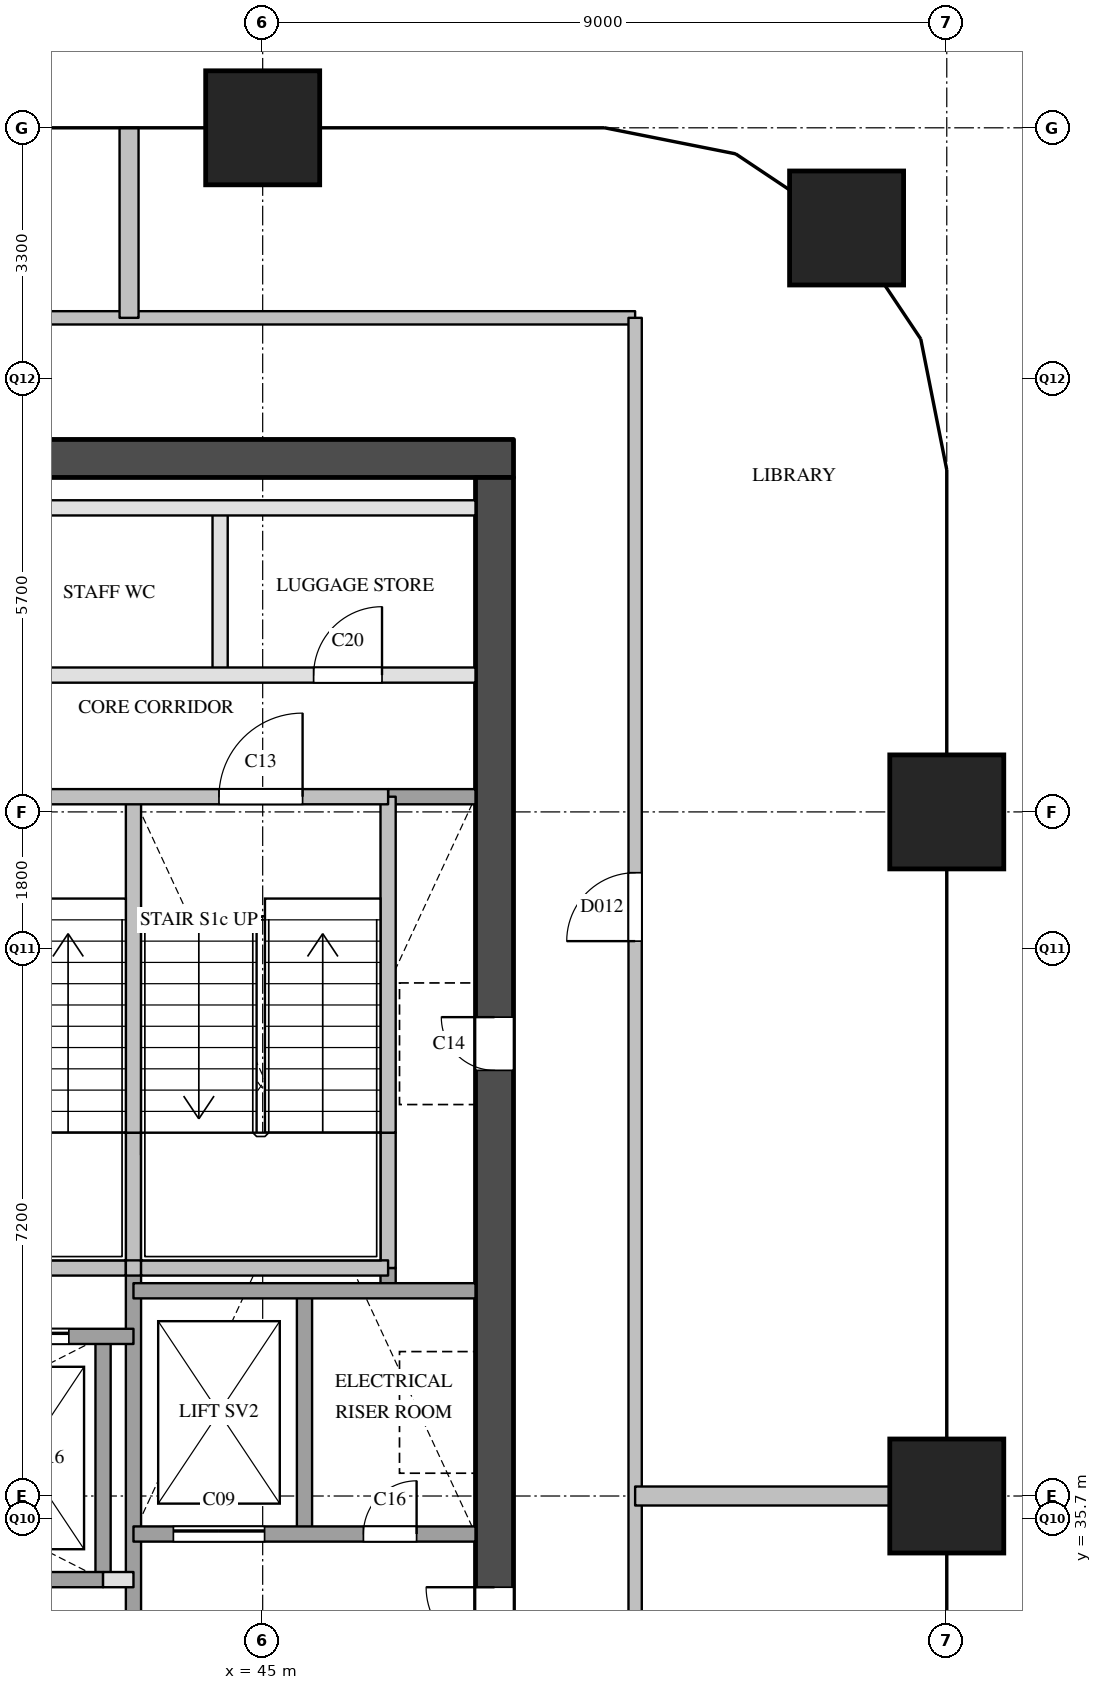
"""IFC4 building model, lengths in metres.
Left out: names, types, materials, properties, quantities, classifications, styles, units other than length and angle.
Written with IfcOpenShell. Run it as: python <this file> out.ifc"""

import sys

from ifc_helpers import new_model, si_unit, direction, frame, frame_2d, origin, origin_2d, place, context, subcontext, project, spatial, rectangle, extrude, element, fill, save


model = new_model("IFC4")
c1 = context("Model", 3, precision=1e-05, world=origin(), true_north=direction((0.0, 1.0)))
c2 = subcontext(c1, "Body", "Model", "MODEL_VIEW")
j1 = project(units=[si_unit("LENGTHUNIT", "METRE"), si_unit("PLANEANGLEUNIT", "RADIAN")], contexts=[c1])
p1 = place(None, origin())
s1 = spatial("IfcSite", under=j1, at=p1, CompositionType="ELEMENT")
p2 = place(p1, origin())
s2 = spatial("IfcBuilding", under=s1, at=p2, CompositionType="ELEMENT")
p3 = place(p2, frame((0.0, 0.0, 154.4)))
s3 = spatial("IfcBuildingStorey", under=s2, at=p3, CompositionType="ELEMENT", Elevation=154.4)
for number, where, z_axis, x_axis in (
    (1, (45.0, 54.0, 0.0), (0.0, 0.0, 1.0), (1.0, 0.0, 0.0)),
    (2, (54.0, 36.0, 0.0), (0.0, 0.0, 1.0), (1.0, 0.0, 0.0)),
    (3, (54.0, 45.0, 0.0), (0.0, 0.0, 1.0), (1.0, 0.0, 0.0)),
    (4, (52.682, 52.682, 0.0), (0.0, 0.0, 1.0), (1.0, 0.0, 0.0)),
):
    element("IfcColumn", number, at=place(p3, frame(where, z_axis=z_axis, x_axis=x_axis)), inside=s3, PredefinedType="COLUMN", context=c2, shape_type="SweptSolid", body=[
        extrude(rectangle(XDim=1.5, YDim=1.5, at=origin_2d()), origin(), (0.0, 0.0, 1.0), 3.9),
    ])
p4 = place(p3, frame((36.1, 49.65, 0.0), z_axis=(0.0, 0.0, 1.0), x_axis=(1.0, 0.0, 0.0)))
e5 = element("IfcWall", 5, at=p4, inside=s3, PredefinedType="SHEAR", context=c2, shape_type="SweptSolid", body=[
    extrude(rectangle(XDim=12.2, YDim=0.5, at=frame_2d((6.1, 0.0))), origin(), (0.0, 0.0, 1.0), 3.6),
])
p5 = place(p3, frame((48.05, 29.1, 0.0), z_axis=(0.0, 0.0, 1.0), x_axis=(0.0, 1.0, 0.0)))
e6 = element("IfcWall", 6, at=p5, inside=s3, PredefinedType="SHEAR", context=c2, shape_type="SweptSolid", body=[
    extrude(rectangle(XDim=20.3, YDim=0.5, at=frame_2d((10.15, 0.0))), origin(), (0.0, 0.0, 1.0), 3.6),
])
p6 = place(p5, frame((12.5, 0.0, 0.0)))
e7 = element("IfcOpeningElement", 7, at=p6, cuts=e6, PredefinedType="OPENING", context=c2, shape_type="SweptSolid", body=[
    extrude(rectangle(XDim=0.7, YDim=2.1, at=frame_2d((0.35, 1.05))), frame((0.0, 0.26, 0.0), z_axis=(0.0, -1.0, 0.0), x_axis=(1.0, 0.0, 0.0)), (0.0, 0.0, 1.0), 0.52),
])
p7 = place(p5, frame((3.9, 0.0, 0.0)))
e8 = element("IfcOpeningElement", 8, at=p7, cuts=e6, PredefinedType="OPENING", context=c2, shape_type="SweptSolid", body=[
    extrude(rectangle(XDim=1.8, YDim=2.1, at=frame_2d((0.9, 1.05))), frame((0.0, 0.26, 0.0), z_axis=(0.0, -1.0, 0.0), x_axis=(1.0, 0.0, 0.0)), (0.0, 0.0, 1.0), 0.52),
])
p8 = place(p3, frame((42.9, 34.9, 0.0), z_axis=(0.0, 0.0, 1.0), x_axis=(0.0, 1.0, 0.0)))
e9 = element("IfcWall", 9, at=p8, inside=s3, PredefinedType="SOLIDWALL", context=c2, shape_type="SweptSolid", body=[
    extrude(rectangle(XDim=3.2, YDim=0.2, at=frame_2d((1.6, 0.0))), origin(), (0.0, 0.0, 1.0), 3.6),
])
p9 = place(p3, frame((43.3, 29.1, 0.0), z_axis=(0.0, 0.0, 1.0), x_axis=(0.0, 1.0, 0.0)))
e10 = element("IfcWall", 10, at=p9, inside=s3, PredefinedType="SOLIDWALL", context=c2, shape_type="SweptSolid", body=[
    extrude(rectangle(XDim=9.9, YDim=0.2, at=frame_2d((4.95, 0.0))), origin(), (0.0, 0.0, 1.0), 3.6),
])
p10 = place(p3, frame((43.3, 39.0, 0.0), z_axis=(0.0, 0.0, 1.0), x_axis=(0.0, 1.0, 0.0)))
e11 = element("IfcWall", 11, at=p10, inside=s3, PredefinedType="SOLIDWALL", context=c2, shape_type="SweptSolid", body=[
    extrude(rectangle(XDim=1.78, YDim=0.2, at=frame_2d((0.89, 0.0))), origin(), (0.0, 0.0, 1.0), 3.6),
])
p11 = place(p3, frame((43.3, 40.78, 0.0), z_axis=(0.0, 0.0, 1.0), x_axis=(0.0, 1.0, 0.0)))
e12 = element("IfcWall", 12, at=p11, inside=s3, PredefinedType="SOLIDWALL", context=c2, shape_type="SweptSolid", body=[
    extrude(rectangle(XDim=4.42, YDim=0.2, at=frame_2d((2.21, 0.0))), origin(), (0.0, 0.0, 1.0), 3.6),
])
p12 = place(p3, frame((44.44, 46.8, 0.0), z_axis=(0.0, 0.0, 1.0), x_axis=(0.0, 1.0, 0.0)))
e13 = element("IfcWall", 13, at=p12, inside=s3, PredefinedType="PARTITIONING", context=c2, shape_type="SweptSolid", body=[
    extrude(rectangle(XDim=2.2, YDim=0.2, at=frame_2d((1.1, 0.0))), origin(), (0.0, 0.0, 1.0), 3.6),
])
p13 = place(p3, frame((45.55, 35.5, 0.0), z_axis=(0.0, 0.0, 1.0), x_axis=(0.0, 1.0, 0.0)))
e14 = element("IfcWall", 14, at=p13, inside=s3, PredefinedType="SOLIDWALL", context=c2, shape_type="SweptSolid", body=[
    extrude(rectangle(XDim=3.2, YDim=0.2, at=frame_2d((1.6, 0.0))), origin(), (0.0, 0.0, 1.0), 3.6),
])
p14 = place(p3, frame((46.65, 38.7, 0.0), z_axis=(0.0, 0.0, 1.0), x_axis=(0.0, 1.0, 0.0)))
e15 = element("IfcWall", 15, at=p14, inside=s3, PredefinedType="SOLIDWALL", context=c2, shape_type="SweptSolid", body=[
    extrude(rectangle(XDim=0.3, YDim=0.2, at=frame_2d((0.15, 0.0))), origin(), (0.0, 0.0, 1.0), 3.6),
])
p15 = place(p3, frame((46.65, 39.0, 0.0), z_axis=(0.0, 0.0, 1.0), x_axis=(0.0, 1.0, 0.0)))
e16 = element("IfcWall", 16, at=p15, inside=s3, PredefinedType="SOLIDWALL", context=c2, shape_type="SweptSolid", body=[
    extrude(rectangle(XDim=1.78, YDim=0.2, at=frame_2d((0.89, 0.0))), origin(), (0.0, 0.0, 1.0), 3.6),
])
p16 = place(p3, frame((46.65, 40.78, 0.0), z_axis=(0.0, 0.0, 1.0), x_axis=(0.0, 1.0, 0.0)))
e17 = element("IfcWall", 17, at=p16, inside=s3, PredefinedType="SOLIDWALL", context=c2, shape_type="SweptSolid", body=[
    extrude(rectangle(XDim=4.42, YDim=0.2, at=frame_2d((2.21, 0.0))), origin(), (0.0, 0.0, 1.0), 3.6),
])
p17 = place(p3, frame((42.9, 34.9, 0.0), z_axis=(0.0, 0.0, 1.0), x_axis=(1.0, 0.0, 0.0)))
e18 = element("IfcWall", 18, at=p17, inside=s3, PredefinedType="PARTITIONING", context=c2, shape_type="SweptSolid", body=[
    extrude(rectangle(XDim=0.4, YDim=0.2, at=frame_2d((0.2, 0.0))), origin(), (0.0, 0.0, 1.0), 3.6),
])
p18 = place(p3, frame((36.6, 34.9, 0.0), z_axis=(0.0, 0.0, 1.0), x_axis=(1.0, 0.0, 0.0)))
e19 = element("IfcWall", 19, at=p18, inside=s3, PredefinedType="SOLIDWALL", context=c2, shape_type="SweptSolid", body=[
    extrude(rectangle(XDim=6.3, YDim=0.2, at=frame_2d((3.15, 0.0))), origin(), (0.0, 0.0, 1.0), 3.6),
])
p19 = place(p3, frame((43.3, 35.5, 0.0), z_axis=(0.0, 0.0, 1.0), x_axis=(1.0, 0.0, 0.0)))
e20 = element("IfcWall", 20, at=p19, inside=s3, PredefinedType="SOLIDWALL", context=c2, shape_type="SweptSolid", body=[
    extrude(rectangle(XDim=4.5, YDim=0.2, at=frame_2d((2.25, 0.0))), origin(), (0.0, 0.0, 1.0), 3.6),
])
p20 = place(p19, frame((0.525, 0.0, 0.0)))
e21 = element("IfcOpeningElement", 21, at=p20, cuts=e20, PredefinedType="OPENING", context=c2, shape_type="SweptSolid", body=[
    extrude(rectangle(XDim=1.2, YDim=2.1, at=frame_2d((0.6, 1.05))), frame((0.0, 0.11, 0.0), z_axis=(0.0, -1.0, 0.0), x_axis=(1.0, 0.0, 0.0)), (0.0, 0.0, 1.0), 0.22),
])
p21 = place(p19, frame((3.025, 0.0, 0.0)))
e22 = element("IfcOpeningElement", 22, at=p21, cuts=e20, PredefinedType="OPENING", context=c2, shape_type="SweptSolid", body=[
    extrude(rectangle(XDim=0.7, YDim=2.1, at=frame_2d((0.35, 1.05))), frame((0.0, 0.11, 0.0), z_axis=(0.0, -1.0, 0.0), x_axis=(1.0, 0.0, 0.0)), (0.0, 0.0, 1.0), 0.22),
])
p22 = place(p3, frame((36.6, 38.1, 0.0), z_axis=(0.0, 0.0, 1.0), x_axis=(1.0, 0.0, 0.0)))
e23 = element("IfcWall", 23, at=p22, inside=s3, PredefinedType="SOLIDWALL", context=c2, shape_type="SweptSolid", body=[
    extrude(rectangle(XDim=6.7, YDim=0.2, at=frame_2d((3.35, 0.0))), origin(), (0.0, 0.0, 1.0), 3.6),
])
p23 = place(p22, frame((0.45, 0.0, 0.0)))
e24 = element("IfcOpeningElement", 24, at=p23, cuts=e23, PredefinedType="OPENING", context=c2, shape_type="SweptSolid", body=[
    extrude(rectangle(XDim=1.2, YDim=2.1, at=frame_2d((0.6, 1.05))), frame((0.0, 0.11, 0.0), z_axis=(0.0, -1.0, 0.0), x_axis=(1.0, 0.0, 0.0)), (0.0, 0.0, 1.0), 0.22),
])
p24 = place(p22, frame((2.55, 0.0, 0.0)))
e25 = element("IfcOpeningElement", 25, at=p24, cuts=e23, PredefinedType="OPENING", context=c2, shape_type="SweptSolid", body=[
    extrude(rectangle(XDim=1.2, YDim=2.1, at=frame_2d((0.6, 1.05))), frame((0.0, 0.11, 0.0), z_axis=(0.0, -1.0, 0.0), x_axis=(1.0, 0.0, 0.0)), (0.0, 0.0, 1.0), 0.22),
])
p25 = place(p22, frame((4.65, 0.0, 0.0)))
e26 = element("IfcOpeningElement", 26, at=p25, cuts=e23, PredefinedType="OPENING", context=c2, shape_type="SweptSolid", body=[
    extrude(rectangle(XDim=1.2, YDim=2.1, at=frame_2d((0.6, 1.05))), frame((0.0, 0.11, 0.0), z_axis=(0.0, -1.0, 0.0), x_axis=(1.0, 0.0, 0.0)), (0.0, 0.0, 1.0), 0.22),
])
p26 = place(p3, frame((43.3, 38.7, 0.0), z_axis=(0.0, 0.0, 1.0), x_axis=(1.0, 0.0, 0.0)))
e27 = element("IfcWall", 27, at=p26, inside=s3, PredefinedType="SOLIDWALL", context=c2, shape_type="SweptSolid", body=[
    extrude(rectangle(XDim=4.5, YDim=0.2, at=frame_2d((2.25, 0.0))), origin(), (0.0, 0.0, 1.0), 3.6),
])
p27 = place(p3, frame((40.05, 39.0, 0.0), z_axis=(0.0, 0.0, 1.0), x_axis=(1.0, 0.0, 0.0)))
e28 = element("IfcWall", 28, at=p27, inside=s3, PredefinedType="SOLIDWALL", context=c2, shape_type="SweptSolid", body=[
    extrude(rectangle(XDim=3.15, YDim=0.2, at=frame_2d((1.575, 0.0))), origin(), (0.0, 0.0, 1.0), 3.6),
])
p28 = place(p3, frame((43.2, 39.0, 0.0), z_axis=(0.0, 0.0, 1.0), x_axis=(1.0, 0.0, 0.0)))
e29 = element("IfcWall", 29, at=p28, inside=s3, PredefinedType="SOLIDWALL", context=c2, shape_type="SweptSolid", body=[
    extrude(rectangle(XDim=0.2, YDim=0.2, at=frame_2d((0.1, 0.0))), origin(), (0.0, 0.0, 1.0), 3.6),
])
p29 = place(p3, frame((43.4, 39.0, 0.0), z_axis=(0.0, 0.0, 1.0), x_axis=(1.0, 0.0, 0.0)))
e30 = element("IfcWall", 30, at=p29, inside=s3, PredefinedType="SOLIDWALL", context=c2, shape_type="SweptSolid", body=[
    extrude(rectangle(XDim=3.25, YDim=0.2, at=frame_2d((1.625, 0.0))), origin(), (0.0, 0.0, 1.0), 3.6),
])
p30 = place(p3, frame((46.65, 45.2, 0.0), z_axis=(0.0, 0.0, 1.0), x_axis=(1.0, 0.0, 0.0)))
e31 = element("IfcWall", 31, at=p30, inside=s3, PredefinedType="SOLIDWALL", context=c2, shape_type="SweptSolid", body=[
    extrude(rectangle(XDim=1.15, YDim=0.2, at=frame_2d((0.575, 0.0))), origin(), (0.0, 0.0, 1.0), 3.6),
])
p31 = place(p3, frame((36.6, 45.2, 0.0), z_axis=(0.0, 0.0, 1.0), x_axis=(1.0, 0.0, 0.0)))
e32 = element("IfcWall", 32, at=p31, inside=s3, PredefinedType="SOLIDWALL", context=c2, shape_type="SweptSolid", body=[
    extrude(rectangle(XDim=10.05, YDim=0.2, at=frame_2d((5.025, 0.0))), origin(), (0.0, 0.0, 1.0), 3.6),
])
p32 = place(p31, frame((1.125, 0.0, 0.0)))
e33 = element("IfcOpeningElement", 33, at=p32, cuts=e32, PredefinedType="OPENING", context=c2, shape_type="SweptSolid", body=[
    extrude(rectangle(XDim=1.1, YDim=2.1, at=frame_2d((0.55, 1.05))), frame((0.0, 0.11, 0.0), z_axis=(0.0, -1.0, 0.0), x_axis=(1.0, 0.0, 0.0)), (0.0, 0.0, 1.0), 0.22),
])
p33 = place(p31, frame((4.475, 0.0, 0.0)))
e34 = element("IfcOpeningElement", 34, at=p33, cuts=e32, PredefinedType="OPENING", context=c2, shape_type="SweptSolid", body=[
    extrude(rectangle(XDim=1.1, YDim=2.1, at=frame_2d((0.55, 1.05))), frame((0.0, 0.11, 0.0), z_axis=(0.0, -1.0, 0.0), x_axis=(1.0, 0.0, 0.0)), (0.0, 0.0, 1.0), 0.22),
])
p34 = place(p31, frame((7.825, 0.0, 0.0)))
e35 = element("IfcOpeningElement", 35, at=p34, cuts=e32, PredefinedType="OPENING", context=c2, shape_type="SweptSolid", body=[
    extrude(rectangle(XDim=1.1, YDim=2.1, at=frame_2d((0.55, 1.05))), frame((0.0, 0.11, 0.0), z_axis=(0.0, -1.0, 0.0), x_axis=(1.0, 0.0, 0.0)), (0.0, 0.0, 1.0), 0.22),
])
p35 = place(p3, frame((36.6, 46.8, 0.0), z_axis=(0.0, 0.0, 1.0), x_axis=(1.0, 0.0, 0.0)))
e36 = element("IfcWall", 36, at=p35, inside=s3, PredefinedType="PARTITIONING", context=c2, shape_type="SweptSolid", body=[
    extrude(rectangle(XDim=11.2, YDim=0.2, at=frame_2d((5.6, 0.0))), origin(), (0.0, 0.0, 1.0), 3.6),
])
p36 = place(p35, frame((0.67, 0.0, 0.0)))
e37 = element("IfcOpeningElement", 37, at=p36, cuts=e36, PredefinedType="OPENING", context=c2, shape_type="SweptSolid", body=[
    extrude(rectangle(XDim=0.9, YDim=2.1, at=frame_2d((0.45, 1.05))), frame((0.0, 0.11, 0.0), z_axis=(0.0, -1.0, 0.0), x_axis=(1.0, 0.0, 0.0)), (0.0, 0.0, 1.0), 0.22),
])
p37 = place(p35, frame((4.59, 0.0, 0.0)))
e38 = element("IfcOpeningElement", 38, at=p37, cuts=e36, PredefinedType="OPENING", context=c2, shape_type="SweptSolid", body=[
    extrude(rectangle(XDim=0.9, YDim=2.1, at=frame_2d((0.45, 1.05))), frame((0.0, 0.11, 0.0), z_axis=(0.0, -1.0, 0.0), x_axis=(1.0, 0.0, 0.0)), (0.0, 0.0, 1.0), 0.22),
])
p38 = place(p35, frame((9.07, 0.0, 0.0)))
e39 = element("IfcOpeningElement", 39, at=p38, cuts=e36, PredefinedType="OPENING", context=c2, shape_type="SweptSolid", body=[
    extrude(rectangle(XDim=0.9, YDim=2.1, at=frame_2d((0.45, 1.05))), frame((0.0, 0.11, 0.0), z_axis=(0.0, -1.0, 0.0), x_axis=(1.0, 0.0, 0.0)), (0.0, 0.0, 1.0), 0.22),
])
p39 = place(p3, frame((36.6, 49.0, 0.0), z_axis=(0.0, 0.0, 1.0), x_axis=(1.0, 0.0, 0.0)))
e40 = element("IfcWall", 40, at=p39, inside=s3, PredefinedType="PARTITIONING", context=c2, shape_type="SweptSolid", body=[
    extrude(rectangle(XDim=11.2, YDim=0.2, at=frame_2d((5.6, 0.0))), origin(), (0.0, 0.0, 1.0), 3.6),
])
p40 = place(p3, frame((34.5, 51.5, 0.0), z_axis=(0.0, 0.0, 1.0), x_axis=(1.0, 0.0, 0.0)))
e41 = element("IfcWall", 41, at=p40, inside=s3, PredefinedType="PARTITIONING", context=c2, shape_type="SweptSolid", body=[
    extrude(rectangle(XDim=15.4, YDim=0.175, at=frame_2d((7.7, 0.0))), origin(), (0.0, 0.0, 1.0), 3.6),
])
p41 = place(p3, frame((49.9, 28.5, 0.0), z_axis=(0.0, 0.0, 1.0), x_axis=(0.0, 1.0, 0.0)))
e42 = element("IfcWall", 42, at=p41, inside=s3, PredefinedType="PARTITIONING", context=c2, shape_type="SweptSolid", body=[
    extrude(rectangle(XDim=23.0, YDim=0.175, at=frame_2d((11.5, 0.0))), origin(), (0.0, 0.0, 1.0), 3.6),
])
p42 = place(p41, frame((3.3, 0.0, 0.0)))
e43 = element("IfcOpeningElement", 43, at=p42, cuts=e42, PredefinedType="OPENING", context=c2, shape_type="SweptSolid", body=[
    extrude(rectangle(XDim=0.9, YDim=2.1, at=frame_2d((0.45, 1.05))), frame((0.0, 0.097, 0.0), z_axis=(0.0, -1.0, 0.0), x_axis=(1.0, 0.0, 0.0)), (0.0, 0.0, 1.0), 0.195),
])
p43 = place(p41, frame((14.8, 0.0, 0.0)))
e44 = element("IfcOpeningElement", 44, at=p43, cuts=e42, PredefinedType="OPENING", context=c2, shape_type="SweptSolid", body=[
    extrude(rectangle(XDim=0.9, YDim=2.1, at=frame_2d((0.45, 1.05))), frame((0.0, 0.097, 0.0), z_axis=(0.0, -1.0, 0.0), x_axis=(1.0, 0.0, 0.0)), (0.0, 0.0, 1.0), 0.195),
])
p44 = place(p3, frame((49.9, 36.0, 0.0), z_axis=(0.0, 0.0, 1.0), x_axis=(1.0, 0.0, 0.0)))
e45 = element("IfcWall", 45, at=p44, inside=s3, PredefinedType="PARTITIONING", context=c2, shape_type="SweptSolid", body=[
    extrude(rectangle(XDim=4.1, YDim=0.25, at=frame_2d((2.05, 0.0))), origin(), (0.0, 0.0, 1.0), 3.6),
])
p45 = place(p3, frame((43.242, 51.5, 0.0), z_axis=(0.0, 0.0, 1.0), x_axis=(0.0, 1.0, 0.0)))
e46 = element("IfcWall", 46, at=p45, inside=s3, PredefinedType="PARTITIONING", context=c2, shape_type="SweptSolid", body=[
    extrude(rectangle(XDim=2.5, YDim=0.25, at=frame_2d((1.25, 0.0))), origin(), (0.0, 0.0, 1.0), 2.6),
])
p46 = place(p25, origin())
e47 = element("IfcDoor", 47, at=p46, inside=s3, OperationType="SLIDING_TO_LEFT", PredefinedType="DOOR", context=c2, shape_type="SweptSolid", body=[
    extrude(rectangle(XDim=1.2, YDim=2.1, at=frame_2d((0.6, 1.05))), frame((0.0, 0.025, 0.0), z_axis=(0.0, -1.0, 0.0), x_axis=(1.0, 0.0, 0.0)), (0.0, 0.0, 1.0), 0.05),
])
fill(e26, e47)
p47 = place(p20, origin())
e48 = element("IfcDoor", 48, at=p47, inside=s3, OperationType="SLIDING_TO_LEFT", PredefinedType="DOOR", context=c2, shape_type="SweptSolid", body=[
    extrude(rectangle(XDim=1.2, YDim=2.1, at=frame_2d((0.6, 1.05))), frame((0.0, 0.025, 0.0), z_axis=(0.0, -1.0, 0.0), x_axis=(1.0, 0.0, 0.0)), (0.0, 0.0, 1.0), 0.05),
])
fill(e21, e48)
p48 = place(p34, origin())
e49 = element("IfcDoor", 49, at=p48, inside=s3, OperationType="SINGLE_SWING_RIGHT", PredefinedType="DOOR", context=c2, shape_type="SweptSolid", body=[
    extrude(rectangle(XDim=1.1, YDim=2.1, at=frame_2d((0.55, 1.05))), frame((0.0, 0.025, 0.0), z_axis=(0.0, -1.0, 0.0), x_axis=(1.0, 0.0, 0.0)), (0.0, 0.0, 1.0), 0.05),
])
fill(e35, e49)
p49 = place(p6, origin())
e50 = element("IfcDoor", 50, at=p49, inside=s3, OperationType="SINGLE_SWING_RIGHT", PredefinedType="DOOR", context=c2, shape_type="SweptSolid", body=[
    extrude(rectangle(XDim=0.7, YDim=2.1, at=frame_2d((0.35, 1.05))), frame((0.0, 0.025, 0.0), z_axis=(0.0, -1.0, 0.0), x_axis=(1.0, 0.0, 0.0)), (0.0, 0.0, 1.0), 0.05),
])
fill(e7, e50)
p50 = place(p7, origin())
e51 = element("IfcDoor", 51, at=p50, inside=s3, OperationType="DOUBLE_DOOR_SINGLE_SWING", PredefinedType="DOOR", context=c2, shape_type="SweptSolid", body=[
    extrude(rectangle(XDim=1.8, YDim=2.1, at=frame_2d((0.9, 1.05))), frame((0.0, 0.025, 0.0), z_axis=(0.0, -1.0, 0.0), x_axis=(1.0, 0.0, 0.0)), (0.0, 0.0, 1.0), 0.05),
])
fill(e8, e51)
p51 = place(p21, origin())
e52 = element("IfcDoor", 52, at=p51, inside=s3, OperationType="SINGLE_SWING_RIGHT", PredefinedType="DOOR", context=c2, shape_type="SweptSolid", body=[
    extrude(rectangle(XDim=0.7, YDim=2.1, at=frame_2d((0.35, 1.05))), frame((0.0, 0.025, 0.0), z_axis=(0.0, -1.0, 0.0), x_axis=(1.0, 0.0, 0.0)), (0.0, 0.0, 1.0), 0.05),
])
fill(e22, e52)
p52 = place(p38, origin())
e53 = element("IfcDoor", 53, at=p52, inside=s3, OperationType="SINGLE_SWING_RIGHT", PredefinedType="DOOR", context=c2, shape_type="SweptSolid", body=[
    extrude(rectangle(XDim=0.9, YDim=2.1, at=frame_2d((0.45, 1.05))), frame((0.0, 0.025, 0.0), z_axis=(0.0, -1.0, 0.0), x_axis=(1.0, 0.0, 0.0)), (0.0, 0.0, 1.0), 0.05),
])
fill(e39, e53)
p53 = place(p43, origin())
e54 = element("IfcDoor", 54, at=p53, inside=s3, OperationType="SINGLE_SWING_LEFT", PredefinedType="DOOR", context=c2, shape_type="SweptSolid", body=[
    extrude(rectangle(XDim=0.9, YDim=2.1, at=frame_2d((0.45, 1.05))), frame((0.0, 0.025, 0.0), z_axis=(0.0, -1.0, 0.0), x_axis=(1.0, 0.0, 0.0)), (0.0, 0.0, 1.0), 0.05),
])
fill(e44, e54)
save(model, sys.argv[1])
